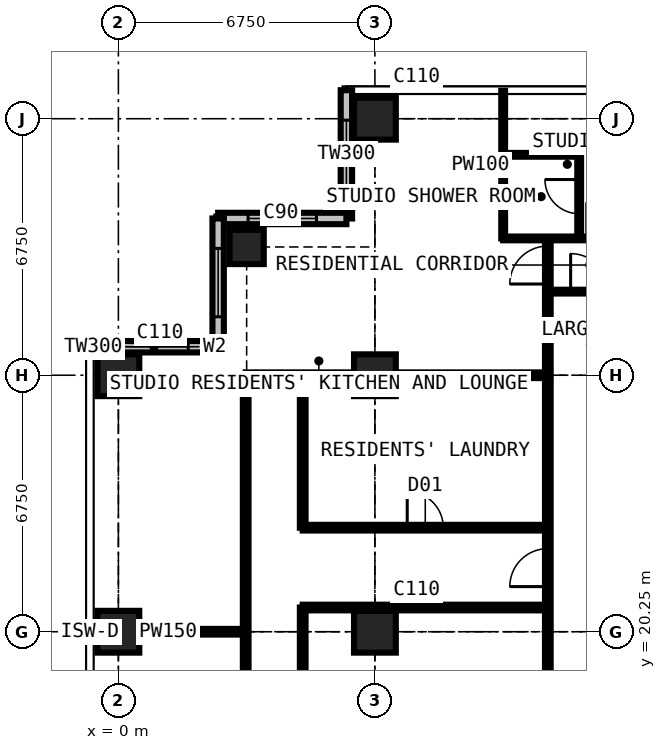
"""IFC4 building model, lengths in metres.
Left out: names, types, materials, properties, quantities, classifications, styles, units other than length and angle.
Written with IfcOpenShell. Run it as: python <this file> out.ifc"""

import sys

from ifc_helpers import new_model, si_unit, direction, frame, frame_2d, origin, origin_2d, place, context, subcontext, project, spatial, rectangle, extrude, element, fill, save


model = new_model("IFC4")
c1 = context("Model", 3, precision=1e-05, world=origin(), true_north=direction((0.0, 1.0)))
c2 = subcontext(c1, "Body", "Model", "MODEL_VIEW")
j1 = project(units=[si_unit("LENGTHUNIT", "METRE"), si_unit("PLANEANGLEUNIT", "RADIAN")], contexts=[c1])
p1 = place(None, origin())
s1 = spatial("IfcSite", under=j1, at=p1, CompositionType="ELEMENT")
p2 = place(p1, origin())
s2 = spatial("IfcBuilding", under=s1, at=p2, CompositionType="ELEMENT")
p3 = place(p2, frame((0.0, 0.0, 215.1)))
s3 = spatial("IfcBuildingStorey", under=s2, at=p3, CompositionType="ELEMENT", Elevation=215.1)
for number, where, z_axis, x_axis in (
    (1, (0.0, 20.25, 0.0), (0.0, 0.0, 1.0), (1.0, 0.0, 0.0)),
    (2, (0.0, 27.0, 0.0), (0.0, 0.0, 1.0), (1.0, 0.0, 0.0)),
):
    element("IfcColumn", number, at=place(p3, frame(where, z_axis=z_axis, x_axis=x_axis)), inside=s3, PredefinedType="COLUMN", context=c2, shape_type="SweptSolid", body=[
        extrude(rectangle(XDim=1.1, YDim=1.1, at=origin_2d()), origin(), (0.0, 0.0, 1.0), 3.6),
    ])
p4 = place(p3, frame((3.375, 30.375, 0.0), z_axis=(0.0, 0.0, 1.0), x_axis=(1.0, 0.0, 0.0)))
e3 = element("IfcColumn", 3, at=p4, inside=s3, PredefinedType="COLUMN", context=c2, shape_type="SweptSolid", body=[
    extrude(rectangle(XDim=0.9, YDim=0.9, at=origin_2d()), origin(), (0.0, 0.0, 1.0), 3.6),
])
for number, where, z_axis, x_axis in (
    (4, (6.75, 20.25, 0.0), (0.0, 0.0, 1.0), (1.0, 0.0, 0.0)),
    (5, (6.75, 27.0, 0.0), (0.0, 0.0, 1.0), (1.0, 0.0, 0.0)),
    (6, (6.75, 33.75, 0.0), (0.0, 0.0, 1.0), (1.0, 0.0, 0.0)),
):
    element("IfcColumn", number, at=place(p3, frame(where, z_axis=z_axis, x_axis=x_axis)), inside=s3, PredefinedType="COLUMN", context=c2, shape_type="SweptSolid", body=[
        extrude(rectangle(XDim=1.1, YDim=1.1, at=origin_2d()), origin(), (0.0, 0.0, 1.0), 3.6),
    ])
p5 = place(p3, frame((6.0, 34.5, 0.0), z_axis=(0.0, 0.0, 1.0), x_axis=(0.0, -1.0, 0.0)))
e7 = element("IfcWall", 7, at=p5, inside=s3, PredefinedType="SOLIDWALL", context=c2, shape_type="SweptSolid", body=[
    extrude(rectangle(XDim=3.375, YDim=0.3, at=frame_2d((1.688, 0.0))), origin(), (0.0, 0.0, 1.0), 3.375),
])
p6 = place(p5, frame((0.788, 0.0, 0.6)))
e8 = element("IfcOpeningElement", 8, at=p6, cuts=e7, PredefinedType="OPENING", context=c2, shape_type="SweptSolid", body=[
    extrude(rectangle(XDim=1.8, YDim=2.1, at=frame_2d((0.9, 1.05))), frame((0.0, 0.16, 0.0), z_axis=(0.0, -1.0, 0.0), x_axis=(1.0, 0.0, 0.0)), (0.0, 0.0, 1.0), 0.32),
])
p7 = place(p3, frame((6.0, 31.125, 0.0), z_axis=(0.0, 0.0, 1.0), x_axis=(-1.0, 0.0, 0.0)))
e9 = element("IfcWall", 9, at=p7, inside=s3, PredefinedType="SOLIDWALL", context=c2, shape_type="SweptSolid", body=[
    extrude(rectangle(XDim=3.375, YDim=0.3, at=frame_2d((1.688, 0.0))), origin(), (0.0, 0.0, 1.0), 3.375),
])
p8 = place(p7, frame((0.788, 0.0, 0.6)))
e10 = element("IfcOpeningElement", 10, at=p8, cuts=e9, PredefinedType="OPENING", context=c2, shape_type="SweptSolid", body=[
    extrude(rectangle(XDim=1.8, YDim=2.1, at=frame_2d((0.9, 1.05))), frame((0.0, 0.16, 0.0), z_axis=(0.0, -1.0, 0.0), x_axis=(1.0, 0.0, 0.0)), (0.0, 0.0, 1.0), 0.32),
])
p9 = place(p3, frame((2.625, 31.125, 0.0), z_axis=(0.0, 0.0, 1.0), x_axis=(0.0, -1.0, 0.0)))
e11 = element("IfcWall", 11, at=p9, inside=s3, PredefinedType="SOLIDWALL", context=c2, shape_type="SweptSolid", body=[
    extrude(rectangle(XDim=3.375, YDim=0.3, at=frame_2d((1.688, 0.0))), origin(), (0.0, 0.0, 1.0), 3.375),
])
p10 = place(p9, frame((0.788, 0.0, 0.6)))
e12 = element("IfcOpeningElement", 12, at=p10, cuts=e11, PredefinedType="OPENING", context=c2, shape_type="SweptSolid", body=[
    extrude(rectangle(XDim=1.8, YDim=2.1, at=frame_2d((0.9, 1.05))), frame((0.0, 0.16, 0.0), z_axis=(0.0, -1.0, 0.0), x_axis=(1.0, 0.0, 0.0)), (0.0, 0.0, 1.0), 0.32),
])
p11 = place(p3, frame((2.625, 27.75, 0.0), z_axis=(0.0, 0.0, 1.0), x_axis=(-1.0, 0.0, 0.0)))
e13 = element("IfcWall", 13, at=p11, inside=s3, PredefinedType="SOLIDWALL", context=c2, shape_type="SweptSolid", body=[
    extrude(rectangle(XDim=3.375, YDim=0.3, at=frame_2d((1.688, 0.0))), origin(), (0.0, 0.0, 1.0), 3.375),
])
p12 = place(p11, frame((0.788, 0.0, 0.6)))
e14 = element("IfcOpeningElement", 14, at=p12, cuts=e13, PredefinedType="OPENING", context=c2, shape_type="SweptSolid", body=[
    extrude(rectangle(XDim=1.8, YDim=2.1, at=frame_2d((0.9, 1.05))), frame((0.0, 0.16, 0.0), z_axis=(0.0, -1.0, 0.0), x_axis=(1.0, 0.0, 0.0)), (0.0, 0.0, 1.0), 0.32),
])
p13 = place(p3, frame((-0.734, 20.25, 0.0), z_axis=(0.0, 0.0, 1.0), x_axis=(1.0, 0.0, 0.0)))
e15 = element("IfcWall", 15, at=p13, inside=s3, PredefinedType="PARTITIONING", context=c2, shape_type="SweptSolid", body=[
    extrude(rectangle(XDim=4.084, YDim=0.15, at=frame_2d((2.042, 0.0))), origin(), (0.0, 0.0, 1.0), 2.877),
])
p14 = place(p3, frame((3.35, 13.5, 0.0), z_axis=(0.0, 0.0, 1.0), x_axis=(0.0, 1.0, 0.0)))
e16 = element("IfcWall", 16, at=p14, inside=s3, PredefinedType="PARTITIONING", context=c2, shape_type="SweptSolid", body=[
    extrude(rectangle(XDim=13.5, YDim=0.15, at=frame_2d((6.75, 0.0))), origin(), (0.0, 0.0, 1.0), 3.375),
])
p15 = place(p14, frame((4.2, 0.0, 0.0)))
e17 = element("IfcOpeningElement", 17, at=p15, cuts=e16, PredefinedType="OPENING", context=c2, shape_type="SweptSolid", body=[
    extrude(rectangle(XDim=0.95, YDim=2.2, at=frame_2d((0.475, 1.1))), frame((0.0, 0.085, 0.0), z_axis=(0.0, -1.0, 0.0), x_axis=(1.0, 0.0, 0.0)), (0.0, 0.0, 1.0), 0.17),
])
p16 = place(p3, frame((3.35, 27.0, 0.0), z_axis=(0.0, 0.0, 1.0), x_axis=(1.0, 0.0, 0.0)))
e18 = element("IfcWall", 18, at=p16, inside=s3, PredefinedType="PARTITIONING", context=c2, shape_type="SweptSolid", body=[
    extrude(rectangle(XDim=7.95, YDim=0.15, at=frame_2d((3.975, 0.0))), origin(), (0.0, 0.0, 1.0), 2.877),
])
p17 = place(p3, frame((4.85, 12.775, 0.0), z_axis=(0.0, 0.0, 1.0), x_axis=(0.0, 1.0, 0.0)))
e19 = element("IfcWall", 19, at=p17, inside=s3, PredefinedType="PARTITIONING", context=c2, shape_type="SweptSolid", body=[
    extrude(rectangle(XDim=8.113, YDim=0.15, at=frame_2d((4.056, 0.0))), origin(), (0.0, 0.0, 1.0), 3.375),
])
p18 = place(p17, frame((3.6, 0.0, 0.0)))
e20 = element("IfcOpeningElement", 20, at=p18, cuts=e19, PredefinedType="OPENING", context=c2, shape_type="SweptSolid", body=[
    extrude(rectangle(XDim=0.95, YDim=2.2, at=frame_2d((0.475, 1.1))), frame((0.0, 0.085, 0.0), z_axis=(0.0, -1.0, 0.0), x_axis=(1.0, 0.0, 0.0)), (0.0, 0.0, 1.0), 0.17),
])
p19 = place(p3, frame((4.85, 20.887, 0.0), z_axis=(0.0, 0.0, 1.0), x_axis=(1.0, 0.0, 0.0)))
e21 = element("IfcWall", 21, at=p19, inside=s3, PredefinedType="PARTITIONING", context=c2, shape_type="SweptSolid", body=[
    extrude(rectangle(XDim=6.45, YDim=0.15, at=frame_2d((3.225, 0.0))), origin(), (0.0, 0.0, 1.0), 3.375),
])
p20 = place(p3, frame((4.85, 22.988, 0.0), z_axis=(0.0, 0.0, 1.0), x_axis=(0.0, 1.0, 0.0)))
e22 = element("IfcWall", 22, at=p20, inside=s3, PredefinedType="PARTITIONING", context=c2, shape_type="SweptSolid", body=[
    extrude(rectangle(XDim=4.012, YDim=0.15, at=frame_2d((2.006, 0.0))), origin(), (0.0, 0.0, 1.0), 3.375),
])
p21 = place(p3, frame((4.85, 22.988, 0.0), z_axis=(0.0, 0.0, 1.0), x_axis=(1.0, 0.0, 0.0)))
e23 = element("IfcWall", 23, at=p21, inside=s3, PredefinedType="PARTITIONING", context=c2, shape_type="SweptSolid", body=[
    extrude(rectangle(XDim=6.45, YDim=0.15, at=frame_2d((3.225, 0.0))), origin(), (0.0, 0.0, 1.0), 3.375),
])
p22 = place(p21, frame((2.75, 0.0, 0.0)))
e24 = element("IfcOpeningElement", 24, at=p22, cuts=e23, PredefinedType="OPENING", context=c2, shape_type="SweptSolid", body=[
    extrude(rectangle(XDim=0.95, YDim=2.2, at=frame_2d((0.475, 1.1))), frame((0.0, 0.085, 0.0), z_axis=(0.0, -1.0, 0.0), x_axis=(1.0, 0.0, 0.0)), (0.0, 0.0, 1.0), 0.17),
])
p23 = place(p3, frame((10.125, 30.6, 0.0), z_axis=(0.0, 0.0, 1.0), x_axis=(0.0, 1.0, 0.0)))
e25 = element("IfcWall", 25, at=p23, inside=s3, PredefinedType="PARTITIONING", context=c2, shape_type="SweptSolid", body=[
    extrude(rectangle(XDim=3.884, YDim=0.1, at=frame_2d((1.942, 0.0))), origin(), (0.0, 0.0, 1.0), 3.375),
])
p24 = place(p3, frame((10.125, 30.6, 0.0), z_axis=(0.0, 0.0, 1.0), x_axis=(1.0, 0.0, 0.0)))
e26 = element("IfcWall", 26, at=p24, inside=s3, PredefinedType="PARTITIONING", context=c2, shape_type="SweptSolid", body=[
    extrude(rectangle(XDim=3.375, YDim=0.1, at=frame_2d((1.688, 0.0))), origin(), (0.0, 0.0, 1.0), 3.375),
])
p25 = place(p24, frame((2.2, 0.0, 0.0)))
e27 = element("IfcOpeningElement", 27, at=p25, cuts=e26, PredefinedType="OPENING", context=c2, shape_type="SweptSolid", body=[
    extrude(rectangle(XDim=0.95, YDim=2.2, at=frame_2d((0.475, 1.1))), frame((0.0, 0.06, 0.0), z_axis=(0.0, -1.0, 0.0), x_axis=(1.0, 0.0, 0.0)), (0.0, 0.0, 1.0), 0.12),
])
p26 = place(p3, frame((10.125, 32.8, 0.0), z_axis=(0.0, 0.0, 1.0), x_axis=(1.0, 0.0, 0.0)))
e28 = element("IfcWall", 28, at=p26, inside=s3, PredefinedType="PARTITIONING", context=c2, shape_type="SweptSolid", body=[
    extrude(rectangle(XDim=2.0, YDim=0.1, at=frame_2d((1.0, 0.0))), origin(), (0.0, 0.0, 1.0), 3.375),
])
p27 = place(p3, frame((11.3, 11.3, 0.0), z_axis=(0.0, 0.0, 1.0), x_axis=(0.0, 1.0, 0.0)))
e29 = element("IfcWall", 29, at=p27, inside=s3, PredefinedType="PARTITIONING", context=c2, shape_type="SweptSolid", body=[
    extrude(rectangle(XDim=19.3, YDim=0.15, at=frame_2d((9.65, 0.0))), origin(), (0.0, 0.0, 1.0), 3.375),
])
p28 = place(p27, frame((18.1, 0.0, 0.0)))
e30 = element("IfcOpeningElement", 30, at=p28, cuts=e29, PredefinedType="OPENING", context=c2, shape_type="SweptSolid", body=[
    extrude(rectangle(XDim=1.0, YDim=2.2, at=frame_2d((0.5, 1.1))), frame((0.0, 0.085, 0.0), z_axis=(0.0, -1.0, 0.0), x_axis=(1.0, 0.0, 0.0)), (0.0, 0.0, 1.0), 0.17),
])
p29 = place(p27, frame((10.137, 0.0, 0.0)))
e31 = element("IfcOpeningElement", 31, at=p29, cuts=e29, PredefinedType="OPENING", context=c2, shape_type="SweptSolid", body=[
    extrude(rectangle(XDim=1.0, YDim=2.2, at=frame_2d((0.5, 1.1))), frame((0.0, 0.085, 0.0), z_axis=(0.0, -1.0, 0.0), x_axis=(1.0, 0.0, 0.0)), (0.0, 0.0, 1.0), 0.17),
])
p30 = place(p3, frame((11.3, 29.2, 0.0), z_axis=(0.0, 0.0, 1.0), x_axis=(1.0, 0.0, 0.0)))
e32 = element("IfcWall", 32, at=p30, inside=s3, PredefinedType="PARTITIONING", context=c2, shape_type="SweptSolid", body=[
    extrude(rectangle(XDim=19.809, YDim=0.1, at=frame_2d((9.904, 0.0))), origin(), (0.0, 0.0, 1.0), 3.375),
])
p31 = place(p30, frame((16.3, 0.0, 0.0)))
e33 = element("IfcOpeningElement", 33, at=p31, cuts=e32, PredefinedType="OPENING", context=c2, shape_type="SweptSolid", body=[
    extrude(rectangle(XDim=1.0, YDim=2.2, at=frame_2d((0.5, 1.1))), frame((0.0, 0.06, 0.0), z_axis=(0.0, -1.0, 0.0), x_axis=(1.0, 0.0, 0.0)), (0.0, 0.0, 1.0), 0.12),
])
p32 = place(p30, frame((6.4, 0.0, 0.0)))
e34 = element("IfcOpeningElement", 34, at=p32, cuts=e32, PredefinedType="OPENING", context=c2, shape_type="SweptSolid", body=[
    extrude(rectangle(XDim=0.95, YDim=2.2, at=frame_2d((0.475, 1.1))), frame((0.0, 0.06, 0.0), z_axis=(0.0, -1.0, 0.0), x_axis=(1.0, 0.0, 0.0)), (0.0, 0.0, 1.0), 0.12),
])
p33 = place(p30, frame((13.15, 0.0, 0.0)))
e35 = element("IfcOpeningElement", 35, at=p33, cuts=e32, PredefinedType="OPENING", context=c2, shape_type="SweptSolid", body=[
    extrude(rectangle(XDim=0.95, YDim=2.2, at=frame_2d((0.475, 1.1))), frame((0.0, 0.06, 0.0), z_axis=(0.0, -1.0, 0.0), x_axis=(1.0, 0.0, 0.0)), (0.0, 0.0, 1.0), 0.12),
])
p34 = place(p30, frame((0.6, 0.0, 0.0)))
e36 = element("IfcOpeningElement", 36, at=p34, cuts=e32, PredefinedType="OPENING", context=c2, shape_type="SweptSolid", body=[
    extrude(rectangle(XDim=1.0, YDim=2.2, at=frame_2d((0.5, 1.1))), frame((0.0, 0.06, 0.0), z_axis=(0.0, -1.0, 0.0), x_axis=(1.0, 0.0, 0.0)), (0.0, 0.0, 1.0), 0.12),
])
p35 = place(p3, frame((12.125, 30.6, 0.0), z_axis=(0.0, 0.0, 1.0), x_axis=(0.0, 1.0, 0.0)))
e37 = element("IfcWall", 37, at=p35, inside=s3, PredefinedType="PARTITIONING", context=c2, shape_type="SweptSolid", body=[
    extrude(rectangle(XDim=2.2, YDim=0.1, at=frame_2d((1.1, 0.0))), origin(), (0.0, 0.0, 1.0), 3.375),
])
p36 = place(p35, frame((0.65, 0.0, 0.0)))
e38 = element("IfcOpeningElement", 38, at=p36, cuts=e37, PredefinedType="OPENING", context=c2, shape_type="SweptSolid", body=[
    extrude(rectangle(XDim=0.9, YDim=2.2, at=frame_2d((0.45, 1.1))), frame((0.0, 0.06, 0.0), z_axis=(0.0, -1.0, 0.0), x_axis=(1.0, 0.0, 0.0)), (0.0, 0.0, 1.0), 0.12),
])
p37 = place(p6, origin())
e39 = element("IfcWindow", 39, at=p37, inside=s3, PartitioningType="SINGLE_PANEL", PredefinedType="WINDOW", context=c2, shape_type="SweptSolid", body=[
    extrude(rectangle(XDim=1.8, YDim=2.1, at=frame_2d((0.9, 1.05))), frame((0.0, 0.03, 0.0), z_axis=(0.0, -1.0, 0.0), x_axis=(1.0, 0.0, 0.0)), (0.0, 0.0, 1.0), 0.06),
])
fill(e8, e39)
p38 = place(p8, origin())
e40 = element("IfcWindow", 40, at=p38, inside=s3, PartitioningType="SINGLE_PANEL", PredefinedType="WINDOW", context=c2, shape_type="SweptSolid", body=[
    extrude(rectangle(XDim=1.8, YDim=2.1, at=frame_2d((0.9, 1.05))), frame((0.0, 0.03, 0.0), z_axis=(0.0, -1.0, 0.0), x_axis=(1.0, 0.0, 0.0)), (0.0, 0.0, 1.0), 0.06),
])
fill(e10, e40)
p39 = place(p10, origin())
e41 = element("IfcWindow", 41, at=p39, inside=s3, PartitioningType="SINGLE_PANEL", PredefinedType="WINDOW", context=c2, shape_type="SweptSolid", body=[
    extrude(rectangle(XDim=1.8, YDim=2.1, at=frame_2d((0.9, 1.05))), frame((0.0, 0.03, 0.0), z_axis=(0.0, -1.0, 0.0), x_axis=(1.0, 0.0, 0.0)), (0.0, 0.0, 1.0), 0.06),
])
fill(e12, e41)
p40 = place(p12, origin())
e42 = element("IfcWindow", 42, at=p40, inside=s3, PartitioningType="SINGLE_PANEL", PredefinedType="WINDOW", context=c2, shape_type="SweptSolid", body=[
    extrude(rectangle(XDim=1.8, YDim=2.1, at=frame_2d((0.9, 1.05))), frame((0.0, 0.03, 0.0), z_axis=(0.0, -1.0, 0.0), x_axis=(1.0, 0.0, 0.0)), (0.0, 0.0, 1.0), 0.06),
])
fill(e14, e42)
p41 = place(p36, origin())
e43 = element("IfcDoor", 43, at=p41, inside=s3, OperationType="SINGLE_SWING_RIGHT", PredefinedType="DOOR", context=c2, shape_type="SweptSolid", body=[
    extrude(rectangle(XDim=0.9, YDim=2.2, at=frame_2d((0.45, 1.1))), frame((0.0, 0.025, 0.0), z_axis=(0.0, -1.0, 0.0), x_axis=(1.0, 0.0, 0.0)), (0.0, 0.0, 1.0), 0.05),
])
fill(e38, e43)
p42 = place(p34, origin())
e44 = element("IfcDoor", 44, at=p42, inside=s3, OperationType="SINGLE_SWING_LEFT", PredefinedType="DOOR", context=c2, shape_type="SweptSolid", body=[
    extrude(rectangle(XDim=1.0, YDim=2.2, at=frame_2d((0.5, 1.1))), frame((0.0, 0.025, 0.0), z_axis=(0.0, -1.0, 0.0), x_axis=(1.0, 0.0, 0.0)), (0.0, 0.0, 1.0), 0.05),
])
fill(e36, e44)
p43 = place(p28, origin())
e45 = element("IfcDoor", 45, at=p43, inside=s3, OperationType="SINGLE_SWING_LEFT", PredefinedType="DOOR", context=c2, shape_type="SweptSolid", body=[
    extrude(rectangle(XDim=1.0, YDim=2.2, at=frame_2d((0.5, 1.1))), frame((0.0, 0.025, 0.0), z_axis=(0.0, -1.0, 0.0), x_axis=(1.0, 0.0, 0.0)), (0.0, 0.0, 1.0), 0.05),
])
fill(e30, e45)
p44 = place(p29, origin())
e46 = element("IfcDoor", 46, at=p44, inside=s3, OperationType="SINGLE_SWING_LEFT", PredefinedType="DOOR", context=c2, shape_type="SweptSolid", body=[
    extrude(rectangle(XDim=1.0, YDim=2.2, at=frame_2d((0.5, 1.1))), frame((0.0, 0.025, 0.0), z_axis=(0.0, -1.0, 0.0), x_axis=(1.0, 0.0, 0.0)), (0.0, 0.0, 1.0), 0.05),
])
fill(e31, e46)
p45 = place(p22, origin())
e47 = element("IfcDoor", 47, at=p45, inside=s3, OperationType="SINGLE_SWING_LEFT", PredefinedType="DOOR", context=c2, shape_type="SweptSolid", body=[
    extrude(rectangle(XDim=0.95, YDim=2.2, at=frame_2d((0.475, 1.1))), frame((0.0, 0.025, 0.0), z_axis=(0.0, -1.0, 0.0), x_axis=(1.0, 0.0, 0.0)), (0.0, 0.0, 1.0), 0.05),
])
fill(e24, e47)
save(model, sys.argv[1])
